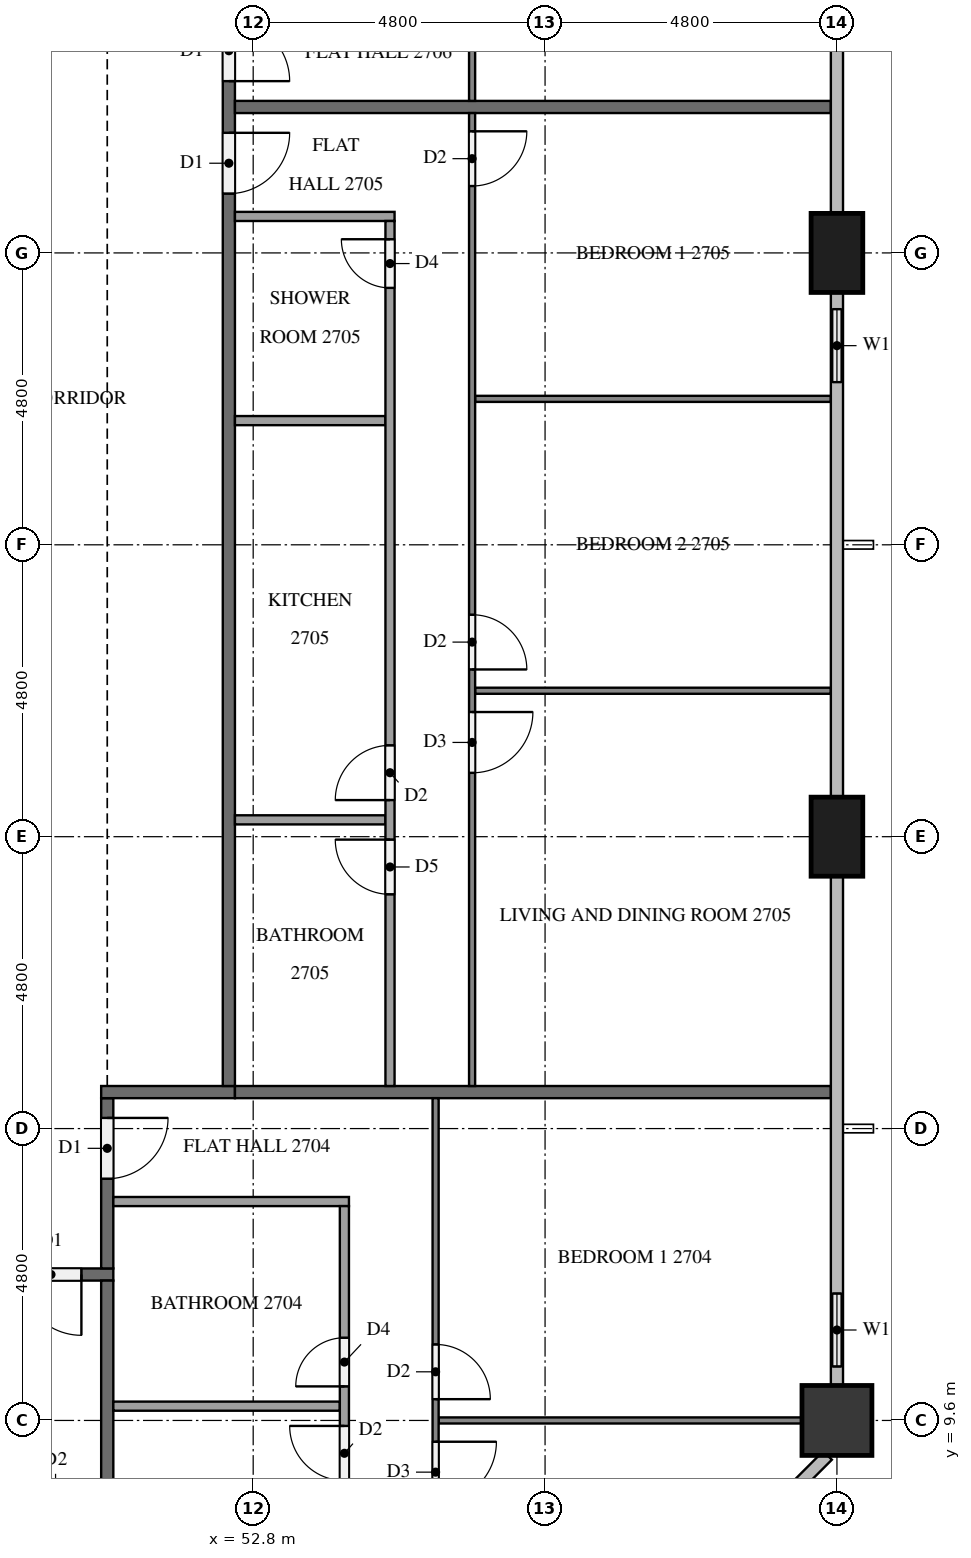
"""IFC4 building model, lengths in metres.
Left out: names, types, materials, properties, quantities, classifications, styles, units other than length and angle.
Written with IfcOpenShell. Run it as: python <this file> out.ifc"""

import sys

from ifc_helpers import new_model, si_unit, direction, frame, frame_2d, origin, origin_2d, place, context, subcontext, project, spatial, rectangle, extrude, element, fill, save


model = new_model("IFC4")
c1 = context("Model", 3, precision=1e-05, world=origin(), true_north=direction((0.0, 1.0)))
c2 = subcontext(c1, "Body", "Model", "MODEL_VIEW")
j1 = project(units=[si_unit("LENGTHUNIT", "METRE"), si_unit("PLANEANGLEUNIT", "RADIAN")], contexts=[c1])
p1 = place(None, origin())
s1 = spatial("IfcSite", under=j1, at=p1, CompositionType="ELEMENT")
p2 = place(p1, origin())
s2 = spatial("IfcBuilding", under=s1, at=p2, CompositionType="ELEMENT")
p3 = place(p2, frame((0.0, 0.0, 106.7)))
s3 = spatial("IfcBuildingStorey", under=s2, at=p3, CompositionType="ELEMENT", Elevation=106.7)
p4 = place(p3, frame((62.4, 9.6, 0.0), z_axis=(0.0, 0.0, 1.0), x_axis=(1.0, 0.0, 0.0)))
e1 = element("IfcColumn", 1, at=p4, inside=s3, PredefinedType="COLUMN", context=c2, shape_type="SweptSolid", body=[
    extrude(rectangle(XDim=1.15, YDim=1.15, at=origin_2d()), origin(), (0.0, 0.0, 1.0), 3.2),
])
for number, where, z_axis, x_axis in (
    (2, (62.4, 19.2, 0.0), (0.0, 0.0, 1.0), (0.0, 1.0, 0.0)),
    (3, (62.4, 28.8, 0.0), (0.0, 0.0, 1.0), (0.0, 1.0, 0.0)),
):
    element("IfcColumn", number, at=place(p3, frame(where, z_axis=z_axis, x_axis=x_axis)), inside=s3, PredefinedType="COLUMN", context=c2, shape_type="SweptSolid", body=[
        extrude(rectangle(XDim=1.3, YDim=0.85, at=origin_2d()), origin(), (0.0, 0.0, 1.0), 3.2),
    ])
p5 = place(p3, frame((62.4, 10.175, 0.0), z_axis=(0.0, 0.0, 1.0), x_axis=(0.0, 1.0, 0.0)))
e4 = element("IfcWall", 4, at=p5, inside=s3, PredefinedType="SOLIDWALL", context=c2, shape_type="SweptSolid", body=[
    extrude(rectangle(XDim=1.825, YDim=0.15, at=frame_2d((0.913, 0.0))), origin(), (0.0, 0.0, 1.0), 3.2),
])
p6 = place(p5, frame((0.312, 0.0, 0.9)))
e5 = element("IfcOpeningElement", 5, at=p6, cuts=e4, PredefinedType="OPENING", context=c2, shape_type="SweptSolid", body=[
    extrude(rectangle(XDim=1.2, YDim=1.4, at=frame_2d((0.6, 0.7))), frame((0.0, 0.085, 0.0), z_axis=(0.0, -1.0, 0.0), x_axis=(1.0, 0.0, 0.0)), (0.0, 0.0, 1.0), 0.17),
])
p7 = place(p3, frame((62.4, 26.4, 0.0), z_axis=(0.0, 0.0, 1.0), x_axis=(0.0, 1.0, 0.0)))
e6 = element("IfcWall", 6, at=p7, inside=s3, PredefinedType="SOLIDWALL", context=c2, shape_type="SweptSolid", body=[
    extrude(rectangle(XDim=1.75, YDim=0.15, at=frame_2d((0.875, 0.0))), origin(), (0.0, 0.0, 1.0), 3.2),
])
p8 = place(p7, frame((0.275, 0.0, 0.9)))
e7 = element("IfcOpeningElement", 7, at=p8, cuts=e6, PredefinedType="OPENING", context=c2, shape_type="SweptSolid", body=[
    extrude(rectangle(XDim=1.2, YDim=1.4, at=frame_2d((0.6, 0.7))), frame((0.0, 0.085, 0.0), z_axis=(0.0, -1.0, 0.0), x_axis=(1.0, 0.0, 0.0)), (0.0, 0.0, 1.0), 0.17),
])
p9 = place(p3, frame((50.5, 12.0, 0.0), z_axis=(0.0, 0.0, 1.0), x_axis=(-1.0, 0.0, 0.0)))
e8 = element("IfcWall", 8, at=p9, inside=s3, PredefinedType="PARTITIONING", context=c2, shape_type="SweptSolid", body=[
    extrude(rectangle(XDim=38.6, YDim=0.2, at=frame_2d((19.3, 0.0))), origin(), (0.0, 0.0, 1.0), 3.2),
])
p10 = place(p9, frame((37.075, 0.0, 0.0)))
e9 = element("IfcOpeningElement", 9, at=p10, cuts=e8, PredefinedType="OPENING", context=c2, shape_type="SweptSolid", body=[
    extrude(rectangle(XDim=1.0, YDim=2.1, at=frame_2d((0.5, 1.05))), frame((0.0, 0.11, 0.0), z_axis=(0.0, -1.0, 0.0), x_axis=(1.0, 0.0, 0.0)), (0.0, 0.0, 1.0), 0.22),
])
p11 = place(p9, frame((22.675, 0.0, 0.0)))
e10 = element("IfcOpeningElement", 10, at=p11, cuts=e8, PredefinedType="OPENING", context=c2, shape_type="SweptSolid", body=[
    extrude(rectangle(XDim=1.0, YDim=2.1, at=frame_2d((0.5, 1.05))), frame((0.0, 0.11, 0.0), z_axis=(0.0, -1.0, 0.0), x_axis=(1.0, 0.0, 0.0)), (0.0, 0.0, 1.0), 0.22),
])
p12 = place(p9, frame((0.525, 0.0, 0.0)))
e11 = element("IfcOpeningElement", 11, at=p12, cuts=e8, PredefinedType="OPENING", context=c2, shape_type="SweptSolid", body=[
    extrude(rectangle(XDim=1.0, YDim=2.1, at=frame_2d((0.5, 1.05))), frame((0.0, 0.11, 0.0), z_axis=(0.0, -1.0, 0.0), x_axis=(1.0, 0.0, 0.0)), (0.0, 0.0, 1.0), 0.22),
])
p13 = place(p3, frame((50.4, 14.9, 0.0), z_axis=(0.0, 0.0, 1.0), x_axis=(0.0, -1.0, 0.0)))
e12 = element("IfcWall", 12, at=p13, inside=s3, PredefinedType="PARTITIONING", context=c2, shape_type="SweptSolid", body=[
    extrude(rectangle(XDim=2.8, YDim=0.2, at=frame_2d((1.4, 0.0))), origin(), (0.0, 0.0, 1.0), 3.2),
])
p14 = place(p13, frame((0.325, 0.0, 0.0)))
e13 = element("IfcOpeningElement", 13, at=p14, cuts=e12, PredefinedType="OPENING", context=c2, shape_type="SweptSolid", body=[
    extrude(rectangle(XDim=1.0, YDim=2.1, at=frame_2d((0.5, 1.05))), frame((0.0, 0.11, 0.0), z_axis=(0.0, -1.0, 0.0), x_axis=(1.0, 0.0, 0.0)), (0.0, 0.0, 1.0), 0.22),
])
p15 = place(p3, frame((50.3, 15.0, 0.0), z_axis=(0.0, 0.0, 1.0), x_axis=(1.0, 0.0, 0.0)))
e14 = element("IfcWall", 14, at=p15, inside=s3, PredefinedType="PARTITIONING", context=c2, shape_type="SweptSolid", body=[
    extrude(rectangle(XDim=2.2, YDim=0.2, at=frame_2d((1.1, 0.0))), origin(), (0.0, 0.0, 1.0), 3.2),
])
p16 = place(p3, frame((52.4, 37.7, 0.0), z_axis=(0.0, 0.0, 1.0), x_axis=(0.0, -1.0, 0.0)))
e15 = element("IfcWall", 15, at=p16, inside=s3, PredefinedType="PARTITIONING", context=c2, shape_type="SweptSolid", body=[
    extrude(rectangle(XDim=22.6, YDim=0.2, at=frame_2d((11.3, 0.0))), origin(), (0.0, 0.0, 1.0), 3.2),
])
p17 = place(p16, frame((6.925, 0.0, 0.0)))
e16 = element("IfcOpeningElement", 16, at=p17, cuts=e15, PredefinedType="OPENING", context=c2, shape_type="SweptSolid", body=[
    extrude(rectangle(XDim=1.0, YDim=2.1, at=frame_2d((0.5, 1.05))), frame((0.0, 0.11, 0.0), z_axis=(0.0, -1.0, 0.0), x_axis=(1.0, 0.0, 0.0)), (0.0, 0.0, 1.0), 0.22),
])
p18 = place(p16, frame((5.075, 0.0, 0.0)))
e17 = element("IfcOpeningElement", 17, at=p18, cuts=e15, PredefinedType="OPENING", context=c2, shape_type="SweptSolid", body=[
    extrude(rectangle(XDim=1.0, YDim=2.1, at=frame_2d((0.5, 1.05))), frame((0.0, 0.11, 0.0), z_axis=(0.0, -1.0, 0.0), x_axis=(1.0, 0.0, 0.0)), (0.0, 0.0, 1.0), 0.22),
])
p19 = place(p3, frame((50.4, 11.9, 0.0), z_axis=(0.0, 0.0, 1.0), x_axis=(0.0, -1.0, 0.0)))
e18 = element("IfcWall", 18, at=p19, inside=s3, PredefinedType="PARTITIONING", context=c2, shape_type="SweptSolid", body=[
    extrude(rectangle(XDim=7.0, YDim=0.2, at=frame_2d((3.5, 0.0))), origin(), (0.0, 0.0, 1.0), 3.2),
])
for number, where, z_axis, x_axis in (
    (19, (52.5, 15.0, 0.0), (0.0, 0.0, 1.0), (1.0, 0.0, 0.0)),
    (20, (52.5, 31.2, 0.0), (0.0, 0.0, 1.0), (1.0, 0.0, 0.0)),
):
    element("IfcWall", number, at=place(p3, frame(where, z_axis=z_axis, x_axis=x_axis)), inside=s3, PredefinedType="PARTITIONING", context=c2, shape_type="SweptSolid", body=[
        extrude(rectangle(XDim=9.8, YDim=0.2, at=frame_2d((4.9, 0.0))), origin(), (0.0, 0.0, 1.0), 3.2),
    ])
p20 = place(p3, frame((55.85, 9.6, 0.0), z_axis=(0.0, 0.0, 1.0), x_axis=(1.0, 0.0, 0.0)))
e21 = element("IfcWall", 21, at=p20, inside=s3, PredefinedType="PARTITIONING", context=c2, shape_type="SweptSolid", body=[
    extrude(rectangle(XDim=5.975, YDim=0.1, at=frame_2d((2.987, 0.0))), origin(), (0.0, 0.0, 1.0), 3.2),
])
p21 = place(p3, frame((55.8, 14.9, 0.0), z_axis=(0.0, 0.0, 1.0), x_axis=(0.0, -1.0, 0.0)))
e22 = element("IfcWall", 22, at=p21, inside=s3, PredefinedType="PARTITIONING", context=c2, shape_type="SweptSolid", body=[
    extrude(rectangle(XDim=10.0, YDim=0.1, at=frame_2d((5.0, 0.0))), origin(), (0.0, 0.0, 1.0), 3.2),
])
p22 = place(p21, frame((4.05, 0.0, 0.0)))
e23 = element("IfcOpeningElement", 23, at=p22, cuts=e22, PredefinedType="OPENING", context=c2, shape_type="SweptSolid", body=[
    extrude(rectangle(XDim=0.9, YDim=2.1, at=frame_2d((0.45, 1.05))), frame((0.0, 0.06, 0.0), z_axis=(0.0, -1.0, 0.0), x_axis=(1.0, 0.0, 0.0)), (0.0, 0.0, 1.0), 0.12),
])
p23 = place(p21, frame((5.65, 0.0, 0.0)))
e24 = element("IfcOpeningElement", 24, at=p23, cuts=e22, PredefinedType="OPENING", context=c2, shape_type="SweptSolid", body=[
    extrude(rectangle(XDim=1.0, YDim=2.1, at=frame_2d((0.5, 1.05))), frame((0.0, 0.06, 0.0), z_axis=(0.0, -1.0, 0.0), x_axis=(1.0, 0.0, 0.0)), (0.0, 0.0, 1.0), 0.12),
])
p24 = place(p3, frame((50.5, 9.835, 0.0), z_axis=(0.0, 0.0, 1.0), x_axis=(1.0, 0.0, 0.0)))
e25 = element("IfcWall", 25, at=p24, inside=s3, PredefinedType="PARTITIONING", context=c2, shape_type="SweptSolid", body=[
    extrude(rectangle(XDim=3.725, YDim=0.15, at=frame_2d((1.863, 0.0))), origin(), (0.0, 0.0, 1.0), 3.2),
])
p25 = place(p3, frame((50.5, 13.2, 0.0), z_axis=(0.0, 0.0, 1.0), x_axis=(1.0, 0.0, 0.0)))
e26 = element("IfcWall", 26, at=p25, inside=s3, PredefinedType="PARTITIONING", context=c2, shape_type="SweptSolid", body=[
    extrude(rectangle(XDim=3.875, YDim=0.15, at=frame_2d((1.938, 0.0))), origin(), (0.0, 0.0, 1.0), 3.2),
])
p26 = place(p3, frame((54.3, 4.9, 0.0), z_axis=(0.0, 0.0, 1.0), x_axis=(0.0, 1.0, 0.0)))
e27 = element("IfcWall", 27, at=p26, inside=s3, PredefinedType="PARTITIONING", context=c2, shape_type="SweptSolid", body=[
    extrude(rectangle(XDim=8.225, YDim=0.15, at=frame_2d((4.113, 0.0))), origin(), (0.0, 0.0, 1.0), 3.2),
])
p27 = place(p26, frame((5.26, 0.0, 0.0)))
e28 = element("IfcOpeningElement", 28, at=p27, cuts=e27, PredefinedType="OPENING", context=c2, shape_type="SweptSolid", body=[
    extrude(rectangle(XDim=0.8, YDim=2.1, at=frame_2d((0.4, 1.05))), frame((0.0, 0.085, 0.0), z_axis=(0.0, -1.0, 0.0), x_axis=(1.0, 0.0, 0.0)), (0.0, 0.0, 1.0), 0.17),
])
p28 = place(p26, frame((3.71, 0.0, 0.0)))
e29 = element("IfcOpeningElement", 29, at=p28, cuts=e27, PredefinedType="OPENING", context=c2, shape_type="SweptSolid", body=[
    extrude(rectangle(XDim=0.9, YDim=2.1, at=frame_2d((0.45, 1.05))), frame((0.0, 0.085, 0.0), z_axis=(0.0, -1.0, 0.0), x_axis=(1.0, 0.0, 0.0)), (0.0, 0.0, 1.0), 0.17),
])
for number, where, z_axis, x_axis in (
    (30, (56.45, 26.4, 0.0), (0.0, 0.0, 1.0), (1.0, 0.0, 0.0)),
    (31, (56.45, 21.6, 0.0), (0.0, 0.0, 1.0), (1.0, 0.0, 0.0)),
):
    element("IfcWall", number, at=place(p3, frame(where, z_axis=z_axis, x_axis=x_axis)), inside=s3, PredefinedType="PARTITIONING", context=c2, shape_type="SweptSolid", body=[
        extrude(rectangle(XDim=5.85, YDim=0.1, at=frame_2d((2.925, 0.0))), origin(), (0.0, 0.0, 1.0), 3.2),
    ])
p29 = place(p3, frame((56.4, 31.1, 0.0), z_axis=(0.0, 0.0, 1.0), x_axis=(0.0, -1.0, 0.0)))
e32 = element("IfcWall", 32, at=p29, inside=s3, PredefinedType="PARTITIONING", context=c2, shape_type="SweptSolid", body=[
    extrude(rectangle(XDim=16.0, YDim=0.1, at=frame_2d((8.0, 0.0))), origin(), (0.0, 0.0, 1.0), 3.2),
])
p30 = place(p29, frame((0.3, 0.0, 0.0)))
e33 = element("IfcOpeningElement", 33, at=p30, cuts=e32, PredefinedType="OPENING", context=c2, shape_type="SweptSolid", body=[
    extrude(rectangle(XDim=0.9, YDim=2.1, at=frame_2d((0.45, 1.05))), frame((0.0, 0.06, 0.0), z_axis=(0.0, -1.0, 0.0), x_axis=(1.0, 0.0, 0.0)), (0.0, 0.0, 1.0), 0.12),
])
p31 = place(p29, frame((8.25, 0.0, 0.0)))
e34 = element("IfcOpeningElement", 34, at=p31, cuts=e32, PredefinedType="OPENING", context=c2, shape_type="SweptSolid", body=[
    extrude(rectangle(XDim=0.9, YDim=2.1, at=frame_2d((0.45, 1.05))), frame((0.0, 0.06, 0.0), z_axis=(0.0, -1.0, 0.0), x_axis=(1.0, 0.0, 0.0)), (0.0, 0.0, 1.0), 0.12),
])
p32 = place(p29, frame((9.85, 0.0, 0.0)))
e35 = element("IfcOpeningElement", 35, at=p32, cuts=e32, PredefinedType="OPENING", context=c2, shape_type="SweptSolid", body=[
    extrude(rectangle(XDim=1.0, YDim=2.1, at=frame_2d((0.5, 1.05))), frame((0.0, 0.06, 0.0), z_axis=(0.0, -1.0, 0.0), x_axis=(1.0, 0.0, 0.0)), (0.0, 0.0, 1.0), 0.12),
])
for number, where, z_axis, x_axis in (
    (36, (52.5, 26.042, 0.0), (0.0, 0.0, 1.0), (1.0, 0.0, 0.0)),
    (37, (52.5, 19.477, 0.0), (0.0, 0.0, 1.0), (1.0, 0.0, 0.0)),
):
    element("IfcWall", number, at=place(p3, frame(where, z_axis=z_axis, x_axis=x_axis)), inside=s3, PredefinedType="PARTITIONING", context=c2, shape_type="SweptSolid", body=[
        extrude(rectangle(XDim=2.475, YDim=0.15, at=frame_2d((1.238, 0.0))), origin(), (0.0, 0.0, 1.0), 3.2),
    ])
p33 = place(p3, frame((52.5, 29.4, 0.0), z_axis=(0.0, 0.0, 1.0), x_axis=(1.0, 0.0, 0.0)))
e38 = element("IfcWall", 38, at=p33, inside=s3, PredefinedType="PARTITIONING", context=c2, shape_type="SweptSolid", body=[
    extrude(rectangle(XDim=2.625, YDim=0.15, at=frame_2d((1.312, 0.0))), origin(), (0.0, 0.0, 1.0), 3.2),
])
p34 = place(p3, frame((55.05, 15.1, 0.0), z_axis=(0.0, 0.0, 1.0), x_axis=(0.0, 1.0, 0.0)))
e39 = element("IfcWall", 39, at=p34, inside=s3, PredefinedType="PARTITIONING", context=c2, shape_type="SweptSolid", body=[
    extrude(rectangle(XDim=14.225, YDim=0.15, at=frame_2d((7.112, 0.0))), origin(), (0.0, 0.0, 1.0), 3.2),
])
p35 = place(p34, frame((13.125, 0.0, 0.0)))
e40 = element("IfcOpeningElement", 40, at=p35, cuts=e39, PredefinedType="OPENING", context=c2, shape_type="SweptSolid", body=[
    extrude(rectangle(XDim=0.8, YDim=2.1, at=frame_2d((0.4, 1.05))), frame((0.0, 0.085, 0.0), z_axis=(0.0, -1.0, 0.0), x_axis=(1.0, 0.0, 0.0)), (0.0, 0.0, 1.0), 0.17),
])
p36 = place(p34, frame((4.702, 0.0, 0.0)))
e41 = element("IfcOpeningElement", 41, at=p36, cuts=e39, PredefinedType="OPENING", context=c2, shape_type="SweptSolid", body=[
    extrude(rectangle(XDim=0.9, YDim=2.1, at=frame_2d((0.45, 1.05))), frame((0.0, 0.085, 0.0), z_axis=(0.0, -1.0, 0.0), x_axis=(1.0, 0.0, 0.0)), (0.0, 0.0, 1.0), 0.17),
])
p37 = place(p34, frame((3.152, 0.0, 0.0)))
e42 = element("IfcOpeningElement", 42, at=p37, cuts=e39, PredefinedType="OPENING", context=c2, shape_type="SweptSolid", body=[
    extrude(rectangle(XDim=0.9, YDim=2.1, at=frame_2d((0.45, 1.05))), frame((0.0, 0.085, 0.0), z_axis=(0.0, -1.0, 0.0), x_axis=(1.0, 0.0, 0.0)), (0.0, 0.0, 1.0), 0.17),
])
p38 = place(p3, frame((56.4, 37.7, 0.0), z_axis=(0.0, 0.0, 1.0), x_axis=(0.0, -1.0, 0.0)))
e43 = element("IfcWall", 43, at=p38, inside=s3, PredefinedType="PARTITIONING", context=c2, shape_type="SweptSolid", body=[
    extrude(rectangle(XDim=6.4, YDim=0.1, at=frame_2d((3.2, 0.0))), origin(), (0.0, 0.0, 1.0), 3.2),
])
p39 = place(p38, frame((0.3, 0.0, 0.0)))
e44 = element("IfcOpeningElement", 44, at=p39, cuts=e43, PredefinedType="OPENING", context=c2, shape_type="SweptSolid", body=[
    extrude(rectangle(XDim=1.0, YDim=2.1, at=frame_2d((0.5, 1.05))), frame((0.0, 0.06, 0.0), z_axis=(0.0, -1.0, 0.0), x_axis=(1.0, 0.0, 0.0)), (0.0, 0.0, 1.0), 0.12),
])
p40 = place(p6, origin())
e45 = element("IfcWindow", 45, at=p40, inside=s3, PartitioningType="SINGLE_PANEL", PredefinedType="WINDOW", context=c2, shape_type="SweptSolid", body=[
    extrude(rectangle(XDim=1.2, YDim=1.4, at=frame_2d((0.6, 0.7))), frame((0.0, 0.03, 0.0), z_axis=(0.0, -1.0, 0.0), x_axis=(1.0, 0.0, 0.0)), (0.0, 0.0, 1.0), 0.06),
])
fill(e5, e45)
p41 = place(p8, origin())
e46 = element("IfcWindow", 46, at=p41, inside=s3, PartitioningType="SINGLE_PANEL", PredefinedType="WINDOW", context=c2, shape_type="SweptSolid", body=[
    extrude(rectangle(XDim=1.2, YDim=1.4, at=frame_2d((0.6, 0.7))), frame((0.0, 0.03, 0.0), z_axis=(0.0, -1.0, 0.0), x_axis=(1.0, 0.0, 0.0)), (0.0, 0.0, 1.0), 0.06),
])
fill(e7, e46)
p42 = place(p12, origin())
e47 = element("IfcDoor", 47, at=p42, inside=s3, OperationType="SINGLE_SWING_LEFT", PredefinedType="DOOR", context=c2, shape_type="SweptSolid", body=[
    extrude(rectangle(XDim=1.0, YDim=2.1, at=frame_2d((0.5, 1.05))), frame((0.0, 0.025, 0.0), z_axis=(0.0, -1.0, 0.0), x_axis=(1.0, 0.0, 0.0)), (0.0, 0.0, 1.0), 0.05),
])
fill(e11, e47)
p43 = place(p14, origin())
e48 = element("IfcDoor", 48, at=p43, inside=s3, OperationType="SINGLE_SWING_LEFT", PredefinedType="DOOR", context=c2, shape_type="SweptSolid", body=[
    extrude(rectangle(XDim=1.0, YDim=2.1, at=frame_2d((0.5, 1.05))), frame((0.0, 0.025, 0.0), z_axis=(0.0, -1.0, 0.0), x_axis=(1.0, 0.0, 0.0)), (0.0, 0.0, 1.0), 0.05),
])
fill(e13, e48)
p44 = place(p17, origin())
e49 = element("IfcDoor", 49, at=p44, inside=s3, OperationType="SINGLE_SWING_LEFT", PredefinedType="DOOR", context=c2, shape_type="SweptSolid", body=[
    extrude(rectangle(XDim=1.0, YDim=2.1, at=frame_2d((0.5, 1.05))), frame((0.0, 0.025, 0.0), z_axis=(0.0, -1.0, 0.0), x_axis=(1.0, 0.0, 0.0)), (0.0, 0.0, 1.0), 0.05),
])
fill(e16, e49)
p45 = place(p18, origin())
e50 = element("IfcDoor", 50, at=p45, inside=s3, OperationType="SINGLE_SWING_RIGHT", PredefinedType="DOOR", context=c2, shape_type="SweptSolid", body=[
    extrude(rectangle(XDim=1.0, YDim=2.1, at=frame_2d((0.5, 1.05))), frame((0.0, 0.025, 0.0), z_axis=(0.0, -1.0, 0.0), x_axis=(1.0, 0.0, 0.0)), (0.0, 0.0, 1.0), 0.05),
])
fill(e17, e50)
p46 = place(p22, origin())
e51 = element("IfcDoor", 51, at=p46, inside=s3, OperationType="SINGLE_SWING_RIGHT", PredefinedType="DOOR", context=c2, shape_type="SweptSolid", body=[
    extrude(rectangle(XDim=0.9, YDim=2.1, at=frame_2d((0.45, 1.05))), frame((0.0, 0.025, 0.0), z_axis=(0.0, -1.0, 0.0), x_axis=(1.0, 0.0, 0.0)), (0.0, 0.0, 1.0), 0.05),
])
fill(e23, e51)
p47 = place(p23, origin())
e52 = element("IfcDoor", 52, at=p47, inside=s3, OperationType="SINGLE_SWING_LEFT", PredefinedType="DOOR", context=c2, shape_type="SweptSolid", body=[
    extrude(rectangle(XDim=1.0, YDim=2.1, at=frame_2d((0.5, 1.05))), frame((0.0, 0.025, 0.0), z_axis=(0.0, -1.0, 0.0), x_axis=(1.0, 0.0, 0.0)), (0.0, 0.0, 1.0), 0.05),
])
fill(e24, e52)
p48 = place(p27, origin())
e53 = element("IfcDoor", 53, at=p48, inside=s3, OperationType="SINGLE_SWING_LEFT", PredefinedType="DOOR", context=c2, shape_type="SweptSolid", body=[
    extrude(rectangle(XDim=0.8, YDim=2.1, at=frame_2d((0.4, 1.05))), frame((0.0, 0.025, 0.0), z_axis=(0.0, -1.0, 0.0), x_axis=(1.0, 0.0, 0.0)), (0.0, 0.0, 1.0), 0.05),
])
fill(e28, e53)
p49 = place(p28, origin())
e54 = element("IfcDoor", 54, at=p49, inside=s3, OperationType="SINGLE_SWING_RIGHT", PredefinedType="DOOR", context=c2, shape_type="SweptSolid", body=[
    extrude(rectangle(XDim=0.9, YDim=2.1, at=frame_2d((0.45, 1.05))), frame((0.0, 0.025, 0.0), z_axis=(0.0, -1.0, 0.0), x_axis=(1.0, 0.0, 0.0)), (0.0, 0.0, 1.0), 0.05),
])
fill(e29, e54)
p50 = place(p30, origin())
e55 = element("IfcDoor", 55, at=p50, inside=s3, OperationType="SINGLE_SWING_LEFT", PredefinedType="DOOR", context=c2, shape_type="SweptSolid", body=[
    extrude(rectangle(XDim=0.9, YDim=2.1, at=frame_2d((0.45, 1.05))), frame((0.0, 0.025, 0.0), z_axis=(0.0, -1.0, 0.0), x_axis=(1.0, 0.0, 0.0)), (0.0, 0.0, 1.0), 0.05),
])
fill(e33, e55)
p51 = place(p31, origin())
e56 = element("IfcDoor", 56, at=p51, inside=s3, OperationType="SINGLE_SWING_RIGHT", PredefinedType="DOOR", context=c2, shape_type="SweptSolid", body=[
    extrude(rectangle(XDim=0.9, YDim=2.1, at=frame_2d((0.45, 1.05))), frame((0.0, 0.025, 0.0), z_axis=(0.0, -1.0, 0.0), x_axis=(1.0, 0.0, 0.0)), (0.0, 0.0, 1.0), 0.05),
])
fill(e34, e56)
p52 = place(p32, origin())
e57 = element("IfcDoor", 57, at=p52, inside=s3, OperationType="SINGLE_SWING_LEFT", PredefinedType="DOOR", context=c2, shape_type="SweptSolid", body=[
    extrude(rectangle(XDim=1.0, YDim=2.1, at=frame_2d((0.5, 1.05))), frame((0.0, 0.025, 0.0), z_axis=(0.0, -1.0, 0.0), x_axis=(1.0, 0.0, 0.0)), (0.0, 0.0, 1.0), 0.05),
])
fill(e35, e57)
p53 = place(p35, origin())
e58 = element("IfcDoor", 58, at=p53, inside=s3, OperationType="SINGLE_SWING_RIGHT", PredefinedType="DOOR", context=c2, shape_type="SweptSolid", body=[
    extrude(rectangle(XDim=0.8, YDim=2.1, at=frame_2d((0.4, 1.05))), frame((0.0, 0.025, 0.0), z_axis=(0.0, -1.0, 0.0), x_axis=(1.0, 0.0, 0.0)), (0.0, 0.0, 1.0), 0.05),
])
fill(e40, e58)
p54 = place(p36, origin())
e59 = element("IfcDoor", 59, at=p54, inside=s3, OperationType="SINGLE_SWING_LEFT", PredefinedType="DOOR", context=c2, shape_type="SweptSolid", body=[
    extrude(rectangle(XDim=0.9, YDim=2.1, at=frame_2d((0.45, 1.05))), frame((0.0, 0.025, 0.0), z_axis=(0.0, -1.0, 0.0), x_axis=(1.0, 0.0, 0.0)), (0.0, 0.0, 1.0), 0.05),
])
fill(e41, e59)
p55 = place(p37, origin())
e60 = element("IfcDoor", 60, at=p55, inside=s3, OperationType="SINGLE_SWING_RIGHT", PredefinedType="DOOR", context=c2, shape_type="SweptSolid", body=[
    extrude(rectangle(XDim=0.9, YDim=2.1, at=frame_2d((0.45, 1.05))), frame((0.0, 0.025, 0.0), z_axis=(0.0, -1.0, 0.0), x_axis=(1.0, 0.0, 0.0)), (0.0, 0.0, 1.0), 0.05),
])
fill(e42, e60)
save(model, sys.argv[1])
